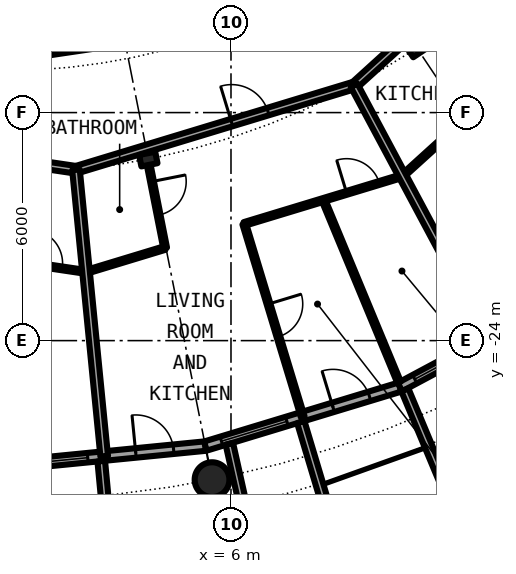
"""IFC4 building model, lengths in metres.
Left out: names, types, materials, properties, quantities, classifications, styles, units other than length and angle.
Written with IfcOpenShell. Run it as: python <this file> out.ifc"""

import sys

from ifc_helpers import new_model, si_unit, direction, frame, frame_2d, origin, origin_2d, place, context, subcontext, project, spatial, rectangle, hollow_circle, i_section, extrude, element, fill, save


model = new_model("IFC4")
c1 = context("Model", 3, precision=1e-05, world=origin(), true_north=direction((0.0, 1.0)))
c2 = subcontext(c1, "Body", "Model", "MODEL_VIEW")
j1 = project(units=[si_unit("LENGTHUNIT", "METRE"), si_unit("PLANEANGLEUNIT", "RADIAN")], contexts=[c1])
p1 = place(None, origin())
s1 = spatial("IfcSite", under=j1, at=p1, CompositionType="ELEMENT")
p2 = place(p1, origin())
s2 = spatial("IfcBuilding", under=s1, at=p2, CompositionType="ELEMENT")
p3 = place(p2, frame((0.0, 0.0, 129.95)))
s3 = spatial("IfcBuildingStorey", under=s2, at=p3, CompositionType="ELEMENT", Elevation=129.95)
p4 = place(p3, frame((5.501, -27.658, 0.0), z_axis=(0.0, 0.0, 1.0), x_axis=(1.0, 0.0, 0.0)))
e1 = element("IfcColumn", 1, at=p4, inside=s3, PredefinedType="COLUMN", context=c2, shape_type="SweptSolid", body=[
    extrude(hollow_circle(Radius=0.457, WallThickness=0.04, at=origin_2d()), origin(), (0.0, 0.0, 1.0), 3.05),
])
for number, where, z_axis, x_axis in (
    (2, (3.824, -19.223, 0.0), (0.0, 0.0, 1.0), (0.195, -0.981, 0.0)),
    (3, (10.889, -16.297, 0.0), (0.0, 0.0, 1.0), (0.556, -0.831, 0.0)),
):
    element("IfcColumn", number, at=place(p3, frame(where, z_axis=z_axis, x_axis=x_axis)), inside=s3, PredefinedType="COLUMN", context=c2, shape_type="SweptSolid", body=[
        extrude(i_section(OverallWidth=0.307, OverallDepth=0.432, WebThickness=0.021, FlangeThickness=0.04, FilletRadius=0.027, at=origin_2d()), origin(), (0.0, 0.0, 1.0), 3.05),
    ])
p5 = place(p3, frame((0.0, -27.3, 0.0), z_axis=(0.0, 0.0, 1.0), x_axis=(0.995173996315, 0.098126026407, 0.0)))
e4 = element("IfcWall", 4, at=p5, inside=s3, PredefinedType="SOLIDWALL", context=c2, shape_type="SweptSolid", body=[
    extrude(rectangle(XDim=5.352, YDim=0.25, at=frame_2d((2.676, 0.0))), origin(), (0.0, 0.0, 1.0), 2.7),
])
p6 = place(p5, frame((0.441, 0.0, 0.3)))
e5 = element("IfcOpeningElement", 5, at=p6, cuts=e4, PredefinedType="OPENING", context=c2, shape_type="SweptSolid", body=[
    extrude(rectangle(XDim=1.8, YDim=2.1, at=frame_2d((0.9, 1.05))), frame((0.0, 0.135, 0.0), z_axis=(0.0, -1.0, 0.0), x_axis=(1.0, 0.0, 0.0)), (0.0, 0.0, 1.0), 0.27),
])
p7 = place(p5, frame((3.51, 0.0, 0.0)))
e6 = element("IfcOpeningElement", 6, at=p7, cuts=e4, PredefinedType="OPENING", context=c2, shape_type="SweptSolid", body=[
    extrude(rectangle(XDim=1.0, YDim=2.2, at=frame_2d((0.5, 1.1))), frame((0.0, 0.135, 0.0), z_axis=(0.0, -1.0, 0.0), x_axis=(1.0, 0.0, 0.0)), (0.0, 0.0, 1.0), 0.27),
])
p8 = place(p3, frame((2.586, -27.171, -0.03), z_axis=(0.0, 0.0, 1.0), x_axis=(0.094548432284, -0.995520262954, 0.0)))
e7 = element("IfcWall", 7, at=p8, inside=s3, PredefinedType="SOLIDWALL", context=c2, shape_type="SweptSolid", body=[
    extrude(rectangle(XDim=3.006, YDim=0.2, at=frame_2d((1.503, 0.0))), origin(), (0.0, 0.0, 1.0), 2.73),
])
p9 = place(p3, frame((5.326, -26.775, 0.0), z_axis=(0.0, 0.0, 1.0), x_axis=(0.956965678721, 0.290201119486, 0.0)))
e8 = element("IfcWall", 8, at=p9, inside=s3, PredefinedType="SOLIDWALL", context=c2, shape_type="SweptSolid", body=[
    extrude(rectangle(XDim=5.351, YDim=0.25, at=frame_2d((2.676, 0.0))), origin(), (0.0, 0.0, 1.0), 2.7),
])
p10 = place(p9, frame((0.441, 0.0, 0.3)))
e9 = element("IfcOpeningElement", 9, at=p10, cuts=e8, PredefinedType="OPENING", context=c2, shape_type="SweptSolid", body=[
    extrude(rectangle(XDim=1.8, YDim=2.1, at=frame_2d((0.9, 1.05))), frame((0.0, 0.135, 0.0), z_axis=(0.0, -1.0, 0.0), x_axis=(1.0, 0.0, 0.0)), (0.0, 0.0, 1.0), 0.27),
])
p11 = place(p9, frame((3.51, 0.0, 0.0)))
e10 = element("IfcOpeningElement", 10, at=p11, cuts=e8, PredefinedType="OPENING", context=c2, shape_type="SweptSolid", body=[
    extrude(rectangle(XDim=1.0, YDim=2.2, at=frame_2d((0.5, 1.1))), frame((0.0, 0.135, 0.0), z_axis=(0.0, -1.0, 0.0), x_axis=(1.0, 0.0, 0.0)), (0.0, 0.0, 1.0), 0.27),
])
p12 = place(p3, frame((5.957, -26.715, -0.03), z_axis=(0.0, 0.0, 1.0), x_axis=(0.217857287091, -0.975980636315, 0.0)))
e11 = element("IfcWall", 11, at=p12, inside=s3, PredefinedType="SOLIDWALL", context=c2, shape_type="SweptSolid", body=[
    extrude(rectangle(XDim=2.928, YDim=0.2, at=frame_2d((1.464, 0.0))), origin(), (0.0, 0.0, 1.0), 2.73),
])
p13 = place(p3, frame((7.837, -26.144, -0.03), z_axis=(0.0, 0.0, 1.0), x_axis=(0.287064767992, -0.957911174889, 0.0)))
e12 = element("IfcWall", 12, at=p13, inside=s3, PredefinedType="SOLIDWALL", context=c2, shape_type="SweptSolid", body=[
    extrude(rectangle(XDim=3.006, YDim=0.2, at=frame_2d((1.503, 0.0))), origin(), (0.0, 0.0, 1.0), 2.73),
])
p14 = place(p3, frame((10.447, -25.222, 0.0), z_axis=(0.0, 0.0, 1.0), x_axis=(0.881915646801, 0.471407246368, 0.0)))
e13 = element("IfcWall", 13, at=p14, inside=s3, PredefinedType="SOLIDWALL", context=c2, shape_type="SweptSolid", body=[
    extrude(rectangle(XDim=5.352, YDim=0.25, at=frame_2d((2.676, 0.0))), origin(), (0.0, 0.0, 1.0), 2.7),
])
p15 = place(p14, frame((0.441, 0.0, 0.3)))
e14 = element("IfcOpeningElement", 14, at=p15, cuts=e13, PredefinedType="OPENING", context=c2, shape_type="SweptSolid", body=[
    extrude(rectangle(XDim=1.8, YDim=2.1, at=frame_2d((0.9, 1.05))), frame((0.0, 0.135, 0.0), z_axis=(0.0, -1.0, 0.0), x_axis=(1.0, 0.0, 0.0)), (0.0, 0.0, 1.0), 0.27),
])
p16 = place(p14, frame((3.51, 0.0, 0.0)))
e15 = element("IfcOpeningElement", 15, at=p16, cuts=e13, PredefinedType="OPENING", context=c2, shape_type="SweptSolid", body=[
    extrude(rectangle(XDim=1.0, YDim=2.2, at=frame_2d((0.5, 1.1))), frame((0.0, 0.135, 0.0), z_axis=(0.0, -1.0, 0.0), x_axis=(1.0, 0.0, 0.0)), (0.0, 0.0, 1.0), 0.27),
])
p17 = place(p3, frame((10.575, -25.295, -0.03), z_axis=(0.0, 0.0, 1.0), x_axis=(0.385697364644, -0.922625353492, 0.0)))
e16 = element("IfcWall", 16, at=p17, inside=s3, PredefinedType="SOLIDWALL", context=c2, shape_type="SweptSolid", body=[
    extrude(rectangle(XDim=2.883, YDim=0.2, at=frame_2d((1.442, 0.0))), origin(), (0.0, 0.0, 1.0), 2.73),
])
p18 = place(p3, frame((2.18, -22.195, 0.0), z_axis=(0.0, 0.0, 1.0), x_axis=(0.956838221976, 0.290621088303, 0.0)))
e17 = element("IfcWall", 17, at=p18, inside=s3, PredefinedType="PARTITIONING", context=c2, shape_type="SweptSolid", body=[
    extrude(rectangle(XDim=2.175, YDim=0.1, at=frame_2d((1.087, 0.0))), origin(), (0.0, 0.0, 1.0), 2.7),
])
p19 = place(p3, frame((6.346, -20.931, 0.0), z_axis=(0.0, 0.0, 1.0), x_axis=(0.956923957423, 0.290338663821, 0.0)))
e18 = element("IfcWall", 18, at=p19, inside=s3, PredefinedType="PARTITIONING", context=c2, shape_type="SweptSolid", body=[
    extrude(rectangle(XDim=4.357, YDim=0.1, at=frame_2d((2.178, 0.0))), origin(), (0.0, 0.0, 1.0), 2.7),
])
p20 = place(p19, frame((2.818, 0.0, 0.0)))
e19 = element("IfcOpeningElement", 19, at=p20, cuts=e18, PredefinedType="OPENING", context=c2, shape_type="SweptSolid", body=[
    extrude(rectangle(XDim=0.9, YDim=2.3, at=frame_2d((0.45, 1.15))), frame((0.0, 0.06, 0.0), z_axis=(0.0, -1.0, 0.0), x_axis=(1.0, 0.0, 0.0)), (0.0, 0.0, 1.0), 0.12),
])
p21 = place(p3, frame((-2.102, -21.557, 0.0), z_axis=(0.0, 0.0, 1.0), x_axis=(0.989171386505, -0.146765009863, 0.0)))
e20 = element("IfcWall", 20, at=p21, inside=s3, PredefinedType="PARTITIONING", context=c2, shape_type="SweptSolid", body=[
    extrude(rectangle(XDim=4.335, YDim=0.1, at=frame_2d((2.167, 0.0))), origin(), (0.0, 0.0, 1.0), 2.7),
])
p22 = place(p21, frame((2.801, 0.0, 0.0)))
e21 = element("IfcOpeningElement", 21, at=p22, cuts=e20, PredefinedType="OPENING", context=c2, shape_type="SweptSolid", body=[
    extrude(rectangle(XDim=0.9, YDim=2.3, at=frame_2d((0.45, 1.15))), frame((0.0, 0.06, 0.0), z_axis=(0.0, -1.0, 0.0), x_axis=(1.0, 0.0, 0.0)), (0.0, 0.0, 1.0), 0.12),
])
p23 = place(p3, frame((10.513, -19.668, 0.0), z_axis=(0.0, 0.0, 1.0), x_axis=(0.74092137325, 0.671591779775, 0.0)))
e22 = element("IfcWall", 22, at=p23, inside=s3, PredefinedType="PARTITIONING", context=c2, shape_type="SweptSolid", body=[
    extrude(rectangle(XDim=4.342, YDim=0.1, at=frame_2d((2.171, 0.0))), origin(), (0.0, 0.0, 1.0), 2.7),
])
p24 = place(p3, frame((1.921, -19.506, 0.0), z_axis=(0.0, 0.0, 1.0), x_axis=(0.956929842753, 0.290319265721, 0.0)))
e23 = element("IfcWall", 23, at=p24, inside=s3, PredefinedType="PARTITIONING", context=c2, shape_type="SweptSolid", body=[
    extrude(rectangle(XDim=7.647, YDim=0.2, at=frame_2d((3.824, 0.0))), origin(), (0.0, 0.0, 1.0), 2.39),
])
p25 = place(p24, frame((4.28, 0.0, 0.0)))
e24 = element("IfcOpeningElement", 24, at=p25, cuts=e23, PredefinedType="OPENING", context=c2, shape_type="SweptSolid", body=[
    extrude(rectangle(XDim=1.0, YDim=2.3, at=frame_2d((0.5, 1.15))), frame((0.0, 0.11, 0.0), z_axis=(0.0, -1.0, 0.0), x_axis=(1.0, 0.0, 0.0)), (0.0, 0.0, 1.0), 0.22),
])
p26 = place(p3, frame((-7.495, -18.111, 0.0), z_axis=(0.0, 0.0, 1.0), x_axis=(0.989215286911, -0.146468823102, 0.0)))
e25 = element("IfcWall", 25, at=p26, inside=s3, PredefinedType="PARTITIONING", context=c2, shape_type="SweptSolid", body=[
    extrude(rectangle(XDim=9.531, YDim=0.2, at=frame_2d((4.766, 0.0))), origin(), (0.0, 0.0, 1.0), 2.39),
])
p27 = place(p26, frame((4.26, 0.0, 0.0)))
e26 = element("IfcOpeningElement", 26, at=p27, cuts=e25, PredefinedType="OPENING", context=c2, shape_type="SweptSolid", body=[
    extrude(rectangle(XDim=1.0, YDim=2.3, at=frame_2d((0.5, 1.15))), frame((0.0, 0.11, 0.0), z_axis=(0.0, -1.0, 0.0), x_axis=(1.0, 0.0, 0.0)), (0.0, 0.0, 1.0), 0.22),
])
p28 = place(p3, frame((9.249, -17.282, 0.0), z_axis=(0.0, 0.0, 1.0), x_axis=(0.740525495356, 0.672028266316, 0.0)))
e27 = element("IfcWall", 27, at=p28, inside=s3, PredefinedType="PARTITIONING", context=c2, shape_type="SweptSolid", body=[
    extrude(rectangle(XDim=5.753, YDim=0.2, at=frame_2d((2.876, 0.0))), origin(), (0.0, 0.0, 1.0), 2.7),
])
p29 = place(p28, frame((4.253, 0.0, 0.0)))
e28 = element("IfcOpeningElement", 28, at=p29, cuts=e27, PredefinedType="OPENING", context=c2, shape_type="SweptSolid", body=[
    extrude(rectangle(XDim=1.0, YDim=2.3, at=frame_2d((0.5, 1.15))), frame((0.0, 0.11, 0.0), z_axis=(0.0, -1.0, 0.0), x_axis=(1.0, 0.0, 0.0)), (0.0, 0.0, 1.0), 0.22),
])
p30 = place(p3, frame((-1.658, -16.819, 0.0), z_axis=(0.0, 0.0, 1.0), x_axis=(0.989191327347, 0.146630549004, 0.0)))
e29 = element("IfcWall", 29, at=p30, inside=s3, PredefinedType="PARTITIONING", context=c2, shape_type="SweptSolid", body=[
    extrude(rectangle(XDim=8.212, YDim=0.2, at=frame_2d((4.106, 0.0))), origin(), (0.0, 0.0, 1.0), 2.7),
])
p31 = place(p30, frame((3.607, 0.0, 0.0)))
e30 = element("IfcOpeningElement", 30, at=p31, cuts=e29, PredefinedType="OPENING", context=c2, shape_type="SweptSolid", body=[
    extrude(rectangle(XDim=1.0, YDim=2.3, at=frame_2d((0.5, 1.15))), frame((0.0, 0.11, 0.0), z_axis=(0.0, -1.0, 0.0), x_axis=(1.0, 0.0, 0.0)), (0.0, 0.0, 1.0), 0.22),
])
p32 = place(p3, frame((1.921, -19.506, 0.0), z_axis=(0.0, 0.0, 1.0), x_axis=(0.098115395479, -0.995175044487, 0.0)))
e31 = element("IfcWall", 31, at=p32, inside=s3, PredefinedType="PARTITIONING", context=c2, shape_type="SweptSolid", body=[
    extrude(rectangle(XDim=7.574, YDim=0.2, at=frame_2d((3.787, 0.0))), origin(), (0.0, 0.0, 1.0), 2.7),
])
p33 = place(p3, frame((3.847, -19.439, 0.0), z_axis=(0.0, 0.0, 1.0), x_axis=(0.194227580483, -0.980956495967, 0.0)))
e32 = element("IfcWall", 32, at=p33, inside=s3, PredefinedType="PARTITIONING", context=c2, shape_type="SweptSolid", body=[
    extrude(rectangle(XDim=2.163, YDim=0.1, at=frame_2d((1.082, 0.0))), origin(), (0.0, 0.0, 1.0), 2.7),
])
p34 = place(p33, frame((0.383, 0.0, 0.0)))
e33 = element("IfcOpeningElement", 33, at=p34, cuts=e32, PredefinedType="OPENING", context=c2, shape_type="SweptSolid", body=[
    extrude(rectangle(XDim=0.9, YDim=2.3, at=frame_2d((0.45, 1.15))), frame((0.0, 0.06, 0.0), z_axis=(0.0, -1.0, 0.0), x_axis=(1.0, 0.0, 0.0)), (0.0, 0.0, 1.0), 0.12),
])
p35 = place(p3, frame((6.349, -20.93, 0.0), z_axis=(0.0, 0.0, 1.0), x_axis=(0.290172218727, -0.956974442438, 0.0)))
e34 = element("IfcWall", 34, at=p35, inside=s3, PredefinedType="PARTITIONING", context=c2, shape_type="SweptSolid", body=[
    extrude(rectangle(XDim=5.303, YDim=0.1, at=frame_2d((2.652, 0.0))), origin(), (0.0, 0.0, 1.0), 2.7),
])
p36 = place(p35, frame((2.202, 0.0, 0.0)))
e35 = element("IfcOpeningElement", 35, at=p36, cuts=e34, PredefinedType="OPENING", context=c2, shape_type="SweptSolid", body=[
    extrude(rectangle(XDim=0.9, YDim=2.3, at=frame_2d((0.45, 1.15))), frame((0.0, 0.06, 0.0), z_axis=(0.0, -1.0, 0.0), x_axis=(1.0, 0.0, 0.0)), (0.0, 0.0, 1.0), 0.12),
])
p37 = place(p3, frame((8.431, -20.298, 0.0), z_axis=(0.0, 0.0, 1.0), x_axis=(0.383480536297, -0.923548958248, 0.0)))
e36 = element("IfcWall", 36, at=p37, inside=s3, PredefinedType="PARTITIONING", context=c2, shape_type="SweptSolid", body=[
    extrude(rectangle(XDim=5.195, YDim=0.1, at=frame_2d((2.598, 0.0))), origin(), (0.0, 0.0, 1.0), 2.7),
])
p38 = place(p3, frame((9.239, -17.286, 0.0), z_axis=(0.0, 0.0, 1.0), x_axis=(0.471439510802, -0.881898399848, 0.0)))
e37 = element("IfcWall", 37, at=p38, inside=s3, PredefinedType="PARTITIONING", context=c2, shape_type="SweptSolid", body=[
    extrude(rectangle(XDim=7.575, YDim=0.2, at=frame_2d((3.787, 0.0))), origin(), (0.0, 0.0, 1.0), 2.7),
])
p39 = place(p6, origin())
e38 = element("IfcWindow", 38, at=p39, inside=s3, PartitioningType="SINGLE_PANEL", PredefinedType="WINDOW", context=c2, shape_type="SweptSolid", body=[
    extrude(rectangle(XDim=1.8, YDim=2.1, at=frame_2d((0.9, 1.05))), frame((0.0, 0.03, 0.0), z_axis=(0.0, -1.0, 0.0), x_axis=(1.0, 0.0, 0.0)), (0.0, 0.0, 1.0), 0.06),
])
fill(e5, e38)
p40 = place(p7, origin())
e39 = element("IfcDoor", 39, at=p40, inside=s3, OperationType="SINGLE_SWING_LEFT", PredefinedType="DOOR", context=c2, shape_type="SweptSolid", body=[
    extrude(rectangle(XDim=1.0, YDim=2.2, at=frame_2d((0.5, 1.1))), frame((0.0, 0.025, 0.0), z_axis=(0.0, -1.0, 0.0), x_axis=(1.0, 0.0, 0.0)), (0.0, 0.0, 1.0), 0.05),
])
fill(e6, e39)
p41 = place(p10, origin())
e40 = element("IfcWindow", 40, at=p41, inside=s3, PartitioningType="SINGLE_PANEL", PredefinedType="WINDOW", context=c2, shape_type="SweptSolid", body=[
    extrude(rectangle(XDim=1.8, YDim=2.1, at=frame_2d((0.9, 1.05))), frame((0.0, 0.03, 0.0), z_axis=(0.0, -1.0, 0.0), x_axis=(1.0, 0.0, 0.0)), (0.0, 0.0, 1.0), 0.06),
])
fill(e9, e40)
p42 = place(p11, origin())
e41 = element("IfcDoor", 41, at=p42, inside=s3, OperationType="SINGLE_SWING_LEFT", PredefinedType="DOOR", context=c2, shape_type="SweptSolid", body=[
    extrude(rectangle(XDim=1.0, YDim=2.2, at=frame_2d((0.5, 1.1))), frame((0.0, 0.025, 0.0), z_axis=(0.0, -1.0, 0.0), x_axis=(1.0, 0.0, 0.0)), (0.0, 0.0, 1.0), 0.05),
])
fill(e10, e41)
p43 = place(p15, origin())
e42 = element("IfcWindow", 42, at=p43, inside=s3, PartitioningType="SINGLE_PANEL", PredefinedType="WINDOW", context=c2, shape_type="SweptSolid", body=[
    extrude(rectangle(XDim=1.8, YDim=2.1, at=frame_2d((0.9, 1.05))), frame((0.0, 0.03, 0.0), z_axis=(0.0, -1.0, 0.0), x_axis=(1.0, 0.0, 0.0)), (0.0, 0.0, 1.0), 0.06),
])
fill(e14, e42)
p44 = place(p22, origin())
e43 = element("IfcDoor", 43, at=p44, inside=s3, OperationType="SINGLE_SWING_RIGHT", PredefinedType="DOOR", context=c2, shape_type="SweptSolid", body=[
    extrude(rectangle(XDim=0.9, YDim=2.3, at=frame_2d((0.45, 1.15))), frame((0.0, 0.025, 0.0), z_axis=(0.0, -1.0, 0.0), x_axis=(1.0, 0.0, 0.0)), (0.0, 0.0, 1.0), 0.05),
])
fill(e21, e43)
p45 = place(p25, origin())
e44 = element("IfcDoor", 44, at=p45, inside=s3, OperationType="SINGLE_SWING_RIGHT", PredefinedType="DOOR", context=c2, shape_type="SweptSolid", body=[
    extrude(rectangle(XDim=1.0, YDim=2.3, at=frame_2d((0.5, 1.15))), frame((0.0, 0.025, 0.0), z_axis=(0.0, -1.0, 0.0), x_axis=(1.0, 0.0, 0.0)), (0.0, 0.0, 1.0), 0.05),
])
fill(e24, e44)
p46 = place(p34, origin())
e45 = element("IfcDoor", 45, at=p46, inside=s3, OperationType="SINGLE_SWING_LEFT", PredefinedType="DOOR", context=c2, shape_type="SweptSolid", body=[
    extrude(rectangle(XDim=0.9, YDim=2.3, at=frame_2d((0.45, 1.15))), frame((0.0, 0.025, 0.0), z_axis=(0.0, -1.0, 0.0), x_axis=(1.0, 0.0, 0.0)), (0.0, 0.0, 1.0), 0.05),
])
fill(e33, e45)
p47 = place(p36, origin())
e46 = element("IfcDoor", 46, at=p47, inside=s3, OperationType="SINGLE_SWING_RIGHT", PredefinedType="DOOR", context=c2, shape_type="SweptSolid", body=[
    extrude(rectangle(XDim=0.9, YDim=2.3, at=frame_2d((0.45, 1.15))), frame((0.0, 0.025, 0.0), z_axis=(0.0, -1.0, 0.0), x_axis=(1.0, 0.0, 0.0)), (0.0, 0.0, 1.0), 0.05),
])
fill(e35, e46)
p48 = place(p20, origin())
e47 = element("IfcDoor", 47, at=p48, inside=s3, OperationType="SINGLE_SWING_RIGHT", PredefinedType="DOOR", context=c2, shape_type="SweptSolid", body=[
    extrude(rectangle(XDim=0.9, YDim=2.3, at=frame_2d((0.45, 1.15))), frame((0.0, 0.025, 0.0), z_axis=(0.0, -1.0, 0.0), x_axis=(1.0, 0.0, 0.0)), (0.0, 0.0, 1.0), 0.05),
])
fill(e19, e47)
save(model, sys.argv[1])
